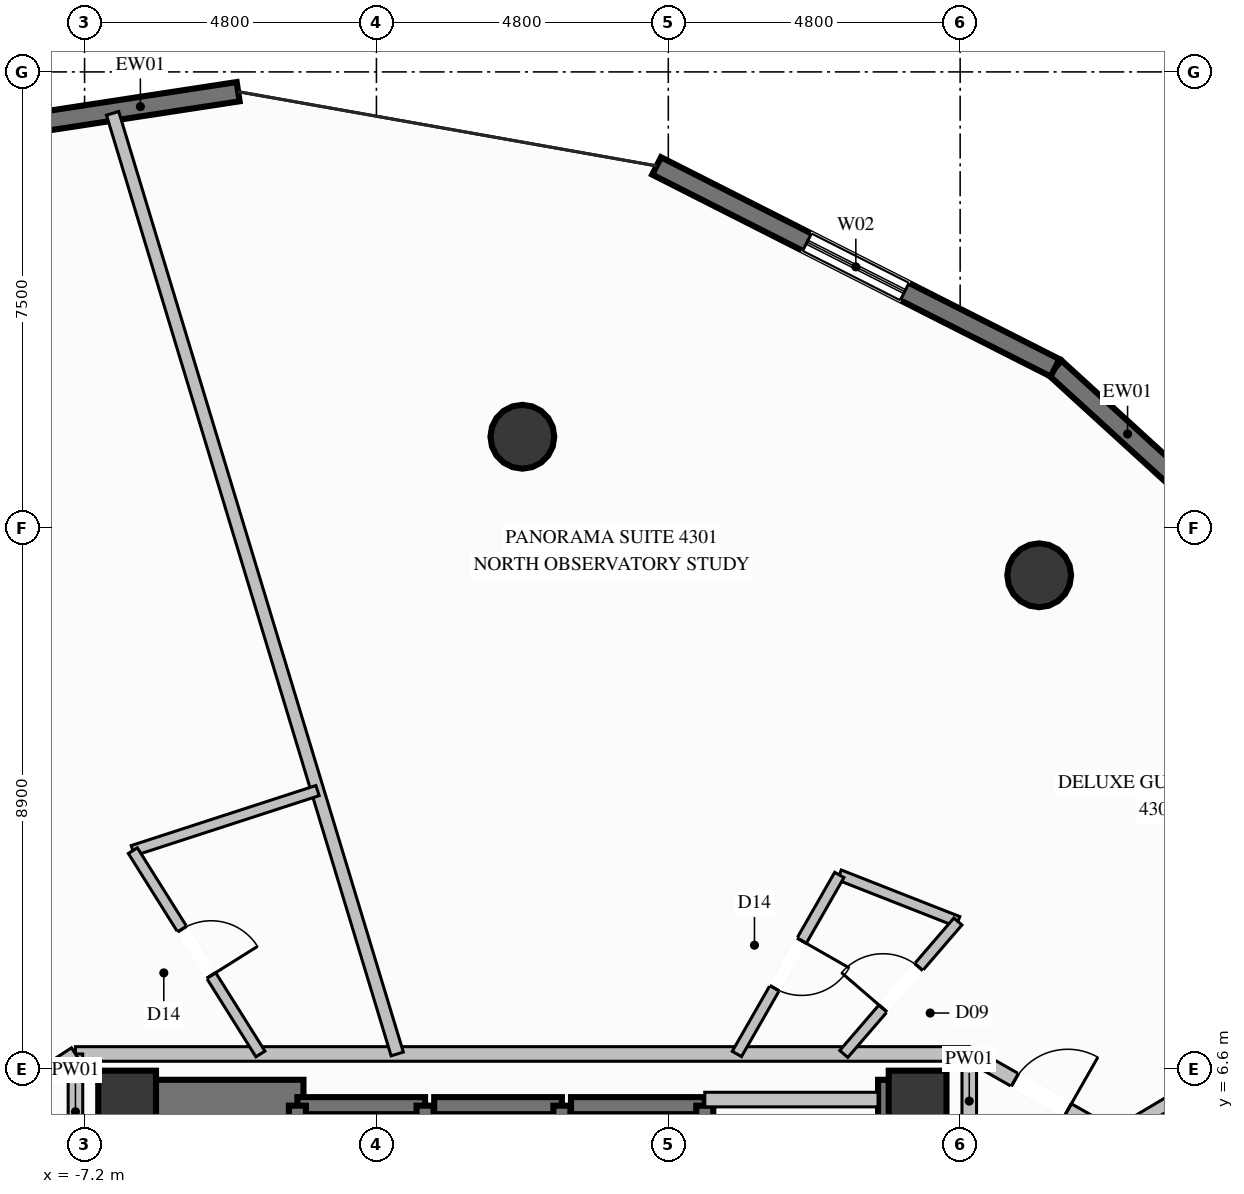
"""IFC4 building model, lengths in metres.
Left out: names, types, materials, properties, quantities, classifications, styles, units other than length and angle.
Written with IfcOpenShell. Run it as: python <this file> out.ifc"""

import sys

from ifc_helpers import new_model, si_unit, direction, frame, frame_2d, origin, origin_2d, place, context, subcontext, project, spatial, rectangle, circle, extrude, element, fill, save


model = new_model("IFC4")
c1 = context("Model", 3, precision=1e-05, world=origin(), true_north=direction((0.0, 1.0)))
c2 = subcontext(c1, "Body", "Model", "MODEL_VIEW")
j1 = project(units=[si_unit("LENGTHUNIT", "METRE"), si_unit("PLANEANGLEUNIT", "RADIAN")], contexts=[c1])
p1 = place(None, origin())
s1 = spatial("IfcSite", under=j1, at=p1, CompositionType="ELEMENT")
p2 = place(p1, origin())
s2 = spatial("IfcBuilding", under=s1, at=p2, CompositionType="ELEMENT")
p3 = place(p2, frame((0.0, 0.0, 160.2)))
s3 = spatial("IfcBuildingStorey", under=s2, at=p3, CompositionType="ELEMENT", Elevation=160.2)
for number, where, z_axis, x_axis in (
    (1, (6.5, 6.1, 0.0), (0.0, 0.0, 1.0), (1.0, 0.0, 0.0)),
    (2, (-6.5, 6.1, 0.0), (0.0, 0.0, 1.0), (1.0, 0.0, 0.0)),
):
    element("IfcColumn", number, at=place(p3, frame(where, z_axis=z_axis, x_axis=x_axis)), inside=s3, PredefinedType="COLUMN", context=c2, shape_type="SweptSolid", body=[
        extrude(rectangle(XDim=0.95, YDim=0.95, at=origin_2d()), origin(), (0.0, 0.0, 1.0), 3.6),
    ])
p4 = place(p3, frame((-6.175, 6.1, 0.0), z_axis=(0.0, 0.0, 1.0), x_axis=(1.0, 0.0, 0.0)))
e3 = element("IfcWall", 3, at=p4, inside=s3, PredefinedType="SHEAR", context=c2, shape_type="SweptSolid", body=[
    extrude(rectangle(XDim=2.575, YDim=0.65, at=frame_2d((1.288, 0.0))), origin(), (0.0, 0.0, 1.0), 3.6),
])
p5 = place(p3, frame((5.85, 6.1, 0.0), z_axis=(0.0, 0.0, 1.0), x_axis=(1.0, 0.0, 0.0)))
e4 = element("IfcWall", 4, at=p5, inside=s3, PredefinedType="SHEAR", context=c2, shape_type="SweptSolid", body=[
    extrude(rectangle(XDim=0.325, YDim=0.65, at=frame_2d((0.163, 0.0))), origin(), (0.0, 0.0, 1.0), 3.6),
])
p6 = place(p3, frame((-6.5, 2.35, 0.0), z_axis=(0.0, 0.0, 1.0), x_axis=(0.0, 1.0, 0.0)))
e5 = element("IfcWall", 5, at=p6, inside=s3, PredefinedType="SHEAR", context=c2, shape_type="SweptSolid", body=[
    extrude(rectangle(XDim=4.075, YDim=0.65, at=frame_2d((2.038, 0.0))), origin(), (0.0, 0.0, 1.0), 3.6),
])
p7 = place(p3, frame((6.5, 3.35, 0.0), z_axis=(0.0, 0.0, 1.0), x_axis=(0.0, 1.0, 0.0)))
e6 = element("IfcWall", 6, at=p7, inside=s3, PredefinedType="SHEAR", context=c2, shape_type="SweptSolid", body=[
    extrude(rectangle(XDim=3.075, YDim=0.65, at=frame_2d((1.538, 0.0))), origin(), (0.0, 0.0, 1.0), 3.6),
])
for number, where, z_axis, x_axis in (
    (7, (8.5, 14.722, 0.0), (0.0, 0.0, 1.0), (1.0, 0.0, 0.0)),
    (8, (0.0, 17.0, 0.0), (0.0, 0.0, 1.0), (1.0, 0.0, 0.0)),
):
    element("IfcColumn", number, at=place(p3, frame(where, z_axis=z_axis, x_axis=x_axis)), inside=s3, PredefinedType="COLUMN", context=c2, shape_type="SweptSolid", body=[
        extrude(circle(Radius=0.525, at=origin_2d()), origin(), (0.0, 0.0, 1.0), 3.6),
    ])
p8 = place(p3, frame((8.761, 18.134, 0.0), z_axis=(0.0, 0.0, 1.0), x_axis=(0.738589670995, -0.674155247624, 0.0)))
e9 = element("IfcWall", 9, at=p8, inside=s3, PredefinedType="SOLIDWALL", context=c2, shape_type="SweptSolid", body=[
    extrude(rectangle(XDim=7.559, YDim=0.32, at=frame_2d((3.78, 0.0))), origin(), (0.0, 0.0, 1.0), 3.2),
])
p9 = place(p8, frame((3.479, 0.0, 0.35)))
e10 = element("IfcOpeningElement", 10, at=p9, cuts=e9, PredefinedType="OPENING", context=c2, shape_type="SweptSolid", body=[
    extrude(rectangle(XDim=1.8, YDim=2.6, at=frame_2d((0.9, 1.3))), frame((0.0, 0.17, 0.0), z_axis=(0.0, -1.0, 0.0), x_axis=(1.0, 0.0, 0.0)), (0.0, 0.0, 1.0), 0.34),
])
p10 = place(p3, frame((2.208, 21.454, 0.0), z_axis=(0.0, 0.0, 1.0), x_axis=(0.892041671527, -0.451953157151, 0.0)))
e11 = element("IfcWall", 11, at=p10, inside=s3, PredefinedType="SOLIDWALL", context=c2, shape_type="SweptSolid", body=[
    extrude(rectangle(XDim=7.346, YDim=0.32, at=frame_2d((3.673, 0.0))), origin(), (0.0, 0.0, 1.0), 3.2),
])
p11 = place(p10, frame((2.773, 0.0, 0.35)))
e12 = element("IfcOpeningElement", 12, at=p11, cuts=e11, PredefinedType="OPENING", context=c2, shape_type="SweptSolid", body=[
    extrude(rectangle(XDim=1.8, YDim=2.6, at=frame_2d((0.9, 1.3))), frame((0.0, 0.17, 0.0), z_axis=(0.0, -1.0, 0.0), x_axis=(1.0, 0.0, 0.0)), (0.0, 0.0, 1.0), 0.34),
])
p12 = place(p3, frame((-11.211, 21.676, 0.0), z_axis=(0.0, 0.0, 1.0), x_axis=(0.988522302644, 0.151075005132, 0.0)))
e13 = element("IfcWall", 13, at=p12, inside=s3, PredefinedType="SOLIDWALL", context=c2, shape_type="SweptSolid", body=[
    extrude(rectangle(XDim=6.613, YDim=0.32, at=frame_2d((3.306, 0.0))), origin(), (0.0, 0.0, 1.0), 3.2),
])
p13 = place(p12, frame((1.309, 0.0, 0.35)))
e14 = element("IfcOpeningElement", 14, at=p13, cuts=e13, PredefinedType="OPENING", context=c2, shape_type="SweptSolid", body=[
    extrude(rectangle(XDim=1.8, YDim=2.6, at=frame_2d((0.9, 1.3))), frame((0.0, 0.17, 0.0), z_axis=(0.0, -1.0, 0.0), x_axis=(1.0, 0.0, 0.0)), (0.0, 0.0, 1.0), 0.34),
])
p14 = place(p3, frame((-1.6, 6.0, 0.0), z_axis=(0.0, 0.0, 1.0), x_axis=(-1.0, 0.0, 0.0)))
e15 = element("IfcWall", 15, at=p14, inside=s3, PredefinedType="SOLIDWALL", context=c2, shape_type="SweptSolid", body=[
    extrude(rectangle(XDim=2.1, YDim=0.28, at=frame_2d((1.05, 0.0))), origin(), (0.0, 0.0, 1.0), 3.2),
])
for number, where, z_axis, x_axis in (
    (16, (-3.7, 6.0, 0.0), (0.0, 0.0, 1.0), (0.0, -1.0, 0.0)),
    (17, (-1.6, 3.5, 0.0), (0.0, 0.0, 1.0), (0.0, 1.0, 0.0)),
):
    element("IfcWall", number, at=place(p3, frame(where, z_axis=z_axis, x_axis=x_axis)), inside=s3, PredefinedType="SOLIDWALL", context=c2, shape_type="SweptSolid", body=[
        extrude(rectangle(XDim=2.5, YDim=0.28, at=frame_2d((1.25, 0.0))), origin(), (0.0, 0.0, 1.0), 3.2),
    ])
p15 = place(p3, frame((0.65, 6.0, 0.0), z_axis=(0.0, 0.0, 1.0), x_axis=(-1.0, 0.0, 0.0)))
e18 = element("IfcWall", 18, at=p15, inside=s3, PredefinedType="SOLIDWALL", context=c2, shape_type="SweptSolid", body=[
    extrude(rectangle(XDim=2.1, YDim=0.28, at=frame_2d((1.05, 0.0))), origin(), (0.0, 0.0, 1.0), 3.2),
])
p16 = place(p3, frame((0.65, 3.5, 0.0), z_axis=(0.0, 0.0, 1.0), x_axis=(0.0, 1.0, 0.0)))
e19 = element("IfcWall", 19, at=p16, inside=s3, PredefinedType="SOLIDWALL", context=c2, shape_type="SweptSolid", body=[
    extrude(rectangle(XDim=2.5, YDim=0.28, at=frame_2d((1.25, 0.0))), origin(), (0.0, 0.0, 1.0), 3.2),
])
p17 = place(p3, frame((3.0, 6.0, 0.0), z_axis=(0.0, 0.0, 1.0), x_axis=(-1.0, 0.0, 0.0)))
e20 = element("IfcWall", 20, at=p17, inside=s3, PredefinedType="SOLIDWALL", context=c2, shape_type="SweptSolid", body=[
    extrude(rectangle(XDim=2.2, YDim=0.28, at=frame_2d((1.1, 0.0))), origin(), (0.0, 0.0, 1.0), 3.2),
])
p18 = place(p3, frame((3.0, 3.5, 0.0), z_axis=(0.0, 0.0, 1.0), x_axis=(0.0, 1.0, 0.0)))
e21 = element("IfcWall", 21, at=p18, inside=s3, PredefinedType="SOLIDWALL", context=c2, shape_type="SweptSolid", body=[
    extrude(rectangle(XDim=2.5, YDim=0.28, at=frame_2d((1.25, 0.0))), origin(), (0.0, 0.0, 1.0), 3.2),
])
p19 = place(p3, frame((-7.35, 6.85, 0.0), z_axis=(0.0, 0.0, 1.0), x_axis=(1.0, 0.0, 0.0)))
e22 = element("IfcWall", 22, at=p19, inside=s3, PredefinedType="PARTITIONING", context=c2, shape_type="SweptSolid", body=[
    extrude(rectangle(XDim=14.7, YDim=0.24, at=frame_2d((7.35, 0.0))), origin(), (0.0, 0.0, 1.0), 2.067),
])
p20 = place(p3, frame((-7.35, 4.95, 0.0), z_axis=(0.0, 0.0, 1.0), x_axis=(0.0, 1.0, 0.0)))
e23 = element("IfcWall", 23, at=p20, inside=s3, PredefinedType="PARTITIONING", context=c2, shape_type="SweptSolid", body=[
    extrude(rectangle(XDim=1.9, YDim=0.24, at=frame_2d((0.95, 0.0))), origin(), (0.0, 0.0, 1.0), 3.2),
])
p21 = place(p3, frame((7.35, 5.3, 0.0), z_axis=(0.0, 0.0, 1.0), x_axis=(0.0, 1.0, 0.0)))
e24 = element("IfcWall", 24, at=p21, inside=s3, PredefinedType="PARTITIONING", context=c2, shape_type="SweptSolid", body=[
    extrude(rectangle(XDim=1.55, YDim=0.24, at=frame_2d((0.775, 0.0))), origin(), (0.0, 0.0, 1.0), 3.2),
])
p22 = place(p3, frame((3.0, 6.1, 0.0), z_axis=(0.0, 0.0, 1.0), x_axis=(1.0, 0.0, 0.0)))
e25 = element("IfcWall", 25, at=p22, inside=s3, PredefinedType="PARTITIONING", context=c2, shape_type="SweptSolid", body=[
    extrude(rectangle(XDim=2.85, YDim=0.24, at=frame_2d((1.425, 0.0))), origin(), (0.0, 0.0, 1.0), 2.067),
])
p23 = place(p3, frame((9.72, 5.5, 0.0), z_axis=(0.0, 0.0, 1.0), x_axis=(0.859846510469, 0.510552620632, 0.0)))
e26 = element("IfcWall", 26, at=p23, inside=s3, PredefinedType="PARTITIONING", context=c2, shape_type="SweptSolid", body=[
    extrude(rectangle(XDim=5.288, YDim=0.21, at=frame_2d((2.644, 0.0))), origin(), (0.0, 0.0, 1.0), 2.067),
])
p24 = place(p3, frame((5.213, 9.794, 0.0), z_axis=(0.0, 0.0, 1.0), x_axis=(0.930796808483, -0.365537004033, 0.0)))
e27 = element("IfcWall", 27, at=p24, inside=s3, PredefinedType="PLUMBINGWALL", context=c2, shape_type="SweptSolid", body=[
    extrude(rectangle(XDim=2.095, YDim=0.175, at=frame_2d((1.048, 0.0))), origin(), (0.0, 0.0, 1.0), 3.2),
])
p25 = place(p3, frame((5.213, 9.794, 0.0), z_axis=(0.0, 0.0, 1.0), x_axis=(-0.496720187918, -0.867910741329, 0.0)))
e28 = element("IfcWall", 28, at=p25, inside=s3, PredefinedType="PLUMBINGWALL", context=c2, shape_type="SweptSolid", body=[
    extrude(rectangle(XDim=3.392, YDim=0.175, at=frame_2d((1.696, 0.0))), origin(), (0.0, 0.0, 1.0), 2.067),
])
p26 = place(p25, frame((1.246, 0.0, 0.0)))
e29 = element("IfcOpeningElement", 29, at=p26, cuts=e28, PredefinedType="OPENING", context=c2, shape_type="SweptSolid", body=[
    extrude(rectangle(XDim=0.9, YDim=2.02, at=frame_2d((0.45, 1.01))), frame((0.0, 0.098, 0.0), z_axis=(0.0, -1.0, 0.0), x_axis=(1.0, 0.0, 0.0)), (0.0, 0.0, 1.0), 0.195),
])
p27 = place(p3, frame((5.286, 6.85, 0.0), z_axis=(0.0, 0.0, 1.0), x_axis=(0.652865714491, 0.757473668745, 0.0)))
e30 = element("IfcWall", 30, at=p27, inside=s3, PredefinedType="PLUMBINGWALL", context=c2, shape_type="SweptSolid", body=[
    extrude(rectangle(XDim=2.875, YDim=0.175, at=frame_2d((1.438, 0.0))), origin(), (0.0, 0.0, 1.0), 3.2),
])
p28 = place(p27, frame((0.988, 0.0, 0.0)))
e31 = element("IfcOpeningElement", 31, at=p28, cuts=e30, PredefinedType="OPENING", context=c2, shape_type="SweptSolid", body=[
    extrude(rectangle(XDim=0.9, YDim=2.1, at=frame_2d((0.45, 1.05))), frame((0.0, 0.098, 0.0), z_axis=(0.0, -1.0, 0.0), x_axis=(1.0, 0.0, 0.0)), (0.0, 0.0, 1.0), 0.195),
])
p29 = place(p3, frame((7.35, 6.85, 0.0), z_axis=(0.0, 0.0, 1.0), x_axis=(0.868892391395, -0.495001022398, 0.0)))
e32 = element("IfcWall", 32, at=p29, inside=s3, PredefinedType="PARTITIONING", context=c2, shape_type="SweptSolid", body=[
    extrude(rectangle(XDim=2.728, YDim=0.24, at=frame_2d((1.364, 0.0))), origin(), (0.0, 0.0, 1.0), 3.2),
])
p30 = place(p29, frame((0.864, 0.0, 0.0)))
e33 = element("IfcOpeningElement", 33, at=p30, cuts=e32, PredefinedType="OPENING", context=c2, shape_type="SweptSolid", body=[
    extrude(rectangle(XDim=1.0, YDim=2.2, at=frame_2d((0.5, 1.1))), frame((0.0, 0.13, 0.0), z_axis=(0.0, -1.0, 0.0), x_axis=(1.0, 0.0, 0.0)), (0.0, 0.0, 1.0), 0.26),
])
p31 = place(p3, frame((-2.058, 6.85, 0.0), z_axis=(0.0, 0.0, 1.0), x_axis=(-0.289629618079, 0.957138800975, 0.0)))
e34 = element("IfcWall", 34, at=p31, inside=s3, PredefinedType="PARTITIONING", context=c2, shape_type="SweptSolid", body=[
    extrude(rectangle(XDim=16.162, YDim=0.21, at=frame_2d((8.081, 0.0))), origin(), (0.0, 0.0, 1.0), 3.2),
])
p32 = place(p3, frame((-6.406, 10.194, 0.0), z_axis=(0.0, 0.0, 1.0), x_axis=(0.951056539239, 0.309016923762, 0.0)))
e35 = element("IfcWall", 35, at=p32, inside=s3, PredefinedType="PLUMBINGWALL", context=c2, shape_type="SweptSolid", body=[
    extrude(rectangle(XDim=3.193, YDim=0.175, at=frame_2d((1.597, 0.0))), origin(), (0.0, 0.0, 1.0), 3.2),
])
p33 = place(p3, frame((-6.406, 10.194, 0.0), z_axis=(0.0, 0.0, 1.0), x_axis=(0.531437993825, -0.847097195556, 0.0)))
e36 = element("IfcWall", 36, at=p33, inside=s3, PredefinedType="PLUMBINGWALL", context=c2, shape_type="SweptSolid", body=[
    extrude(rectangle(XDim=3.948, YDim=0.175, at=frame_2d((1.974, 0.0))), origin(), (0.0, 0.0, 1.0), 2.067),
])
p34 = place(p33, frame((1.524, 0.0, 0.0)))
e37 = element("IfcOpeningElement", 37, at=p34, cuts=e36, PredefinedType="OPENING", context=c2, shape_type="SweptSolid", body=[
    extrude(rectangle(XDim=0.9, YDim=2.02, at=frame_2d((0.45, 1.01))), frame((0.0, 0.098, 0.0), z_axis=(0.0, -1.0, 0.0), x_axis=(1.0, 0.0, 0.0)), (0.0, 0.0, 1.0), 0.195),
])
p35 = place(p3, frame((-9.42, 5.5, 0.0), z_axis=(0.0, 0.0, 1.0), x_axis=(0.837571286912, 0.546328051029, 0.0)))
e38 = element("IfcWall", 38, at=p35, inside=s3, PredefinedType="PARTITIONING", context=c2, shape_type="SweptSolid", body=[
    extrude(rectangle(XDim=2.471, YDim=0.24, at=frame_2d((1.236, 0.0))), origin(), (0.0, 0.0, 1.0), 3.2),
])
p36 = place(p35, frame((0.736, 0.0, 0.0)))
e39 = element("IfcOpeningElement", 39, at=p36, cuts=e38, PredefinedType="OPENING", context=c2, shape_type="SweptSolid", body=[
    extrude(rectangle(XDim=1.0, YDim=2.2, at=frame_2d((0.5, 1.1))), frame((0.0, 0.13, 0.0), z_axis=(0.0, -1.0, 0.0), x_axis=(1.0, 0.0, 0.0)), (0.0, 0.0, 1.0), 0.26),
])
p37 = place(p11, origin())
e40 = element("IfcWindow", 40, at=p37, inside=s3, PartitioningType="SINGLE_PANEL", PredefinedType="WINDOW", context=c2, shape_type="SweptSolid", body=[
    extrude(rectangle(XDim=1.8, YDim=2.6, at=frame_2d((0.9, 1.3))), frame((0.0, 0.03, 0.0), z_axis=(0.0, -1.0, 0.0), x_axis=(1.0, 0.0, 0.0)), (0.0, 0.0, 1.0), 0.06),
])
fill(e12, e40)
p38 = place(p28, origin())
e41 = element("IfcDoor", 41, at=p38, inside=s3, OperationType="SINGLE_SWING_LEFT", PredefinedType="DOOR", context=c2, shape_type="SweptSolid", body=[
    extrude(rectangle(XDim=0.9, YDim=2.1, at=frame_2d((0.45, 1.05))), frame((0.0, 0.025, 0.0), z_axis=(0.0, -1.0, 0.0), x_axis=(1.0, 0.0, 0.0)), (0.0, 0.0, 1.0), 0.05),
])
fill(e31, e41)
p39 = place(p30, origin())
e42 = element("IfcDoor", 42, at=p39, inside=s3, OperationType="SINGLE_SWING_RIGHT", PredefinedType="DOOR", context=c2, shape_type="SweptSolid", body=[
    extrude(rectangle(XDim=1.0, YDim=2.2, at=frame_2d((0.5, 1.1))), frame((0.0, 0.025, 0.0), z_axis=(0.0, -1.0, 0.0), x_axis=(1.0, 0.0, 0.0)), (0.0, 0.0, 1.0), 0.05),
])
fill(e33, e42)
p40 = place(p26, origin())
e43 = element("IfcDoor", 43, at=p40, inside=s3, OperationType="SINGLE_SWING_LEFT", PredefinedType="DOOR", context=c2, shape_type="SweptSolid", body=[
    extrude(rectangle(XDim=0.9, YDim=2.02, at=frame_2d((0.45, 1.01))), frame((0.0, 0.025, 0.0), z_axis=(0.0, -1.0, 0.0), x_axis=(1.0, 0.0, 0.0)), (0.0, 0.0, 1.0), 0.05),
])
fill(e29, e43)
p41 = place(p34, origin())
e44 = element("IfcDoor", 44, at=p41, inside=s3, OperationType="SINGLE_SWING_RIGHT", PredefinedType="DOOR", context=c2, shape_type="SweptSolid", body=[
    extrude(rectangle(XDim=0.9, YDim=2.02, at=frame_2d((0.45, 1.01))), frame((0.0, 0.025, 0.0), z_axis=(0.0, -1.0, 0.0), x_axis=(1.0, 0.0, 0.0)), (0.0, 0.0, 1.0), 0.05),
])
fill(e37, e44)
save(model, sys.argv[1])
